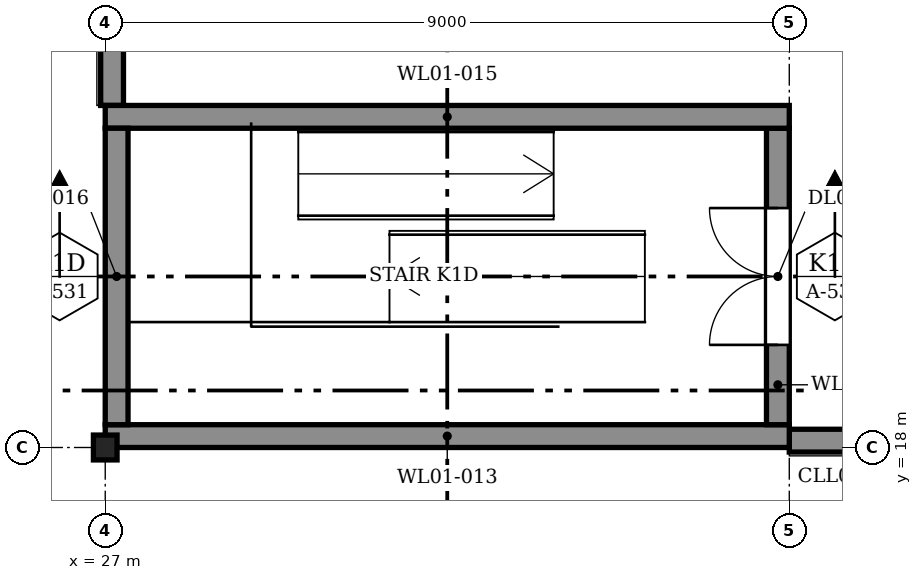
"""IFC4 building model, lengths in metres.
Left out: names, types, materials, properties, quantities, classifications, styles, units other than length and angle.
Written with IfcOpenShell. Run it as: python <this file> out.ifc"""

import sys

from ifc_helpers import new_model, si_unit, direction, frame, frame_2d, origin, origin_2d, place, context, subcontext, project, spatial, rectangle, i_section, extrude, element, fill, save


model = new_model("IFC4")
c1 = context("Model", 3, precision=1e-05, world=origin(), true_north=direction((0.0, 1.0)))
c2 = subcontext(c1, "Body", "Model", "MODEL_VIEW")
j1 = project(units=[si_unit("LENGTHUNIT", "METRE"), si_unit("PLANEANGLEUNIT", "RADIAN")], contexts=[c1])
p1 = place(None, origin())
s1 = spatial("IfcSite", under=j1, at=p1, CompositionType="ELEMENT")
p2 = place(p1, origin())
s2 = spatial("IfcBuilding", under=s1, at=p2, CompositionType="ELEMENT")
p3 = place(p2, frame((0.0, 0.0, 5.0)))
s3 = spatial("IfcBuildingStorey", under=s2, at=p3, CompositionType="ELEMENT", Elevation=5.0)
p4 = place(p3, frame((27.0, 18.0, 0.0), z_axis=(0.0, 0.0, 1.0), x_axis=(1.0, 0.0, 0.0)))
e1 = element("IfcColumn", 1, at=p4, inside=s3, PredefinedType="COLUMN", context=c2, shape_type="SweptSolid", body=[
    extrude(i_section(OverallWidth=0.311, OverallDepth=0.327, WebThickness=0.016, FlangeThickness=0.025, FilletRadius=0.017, at=origin_2d()), origin(), (0.0, 0.0, 1.0), 3.757),
])
p5 = place(p3, frame((27.09, 22.5, 0.0), z_axis=(0.0, 0.0, 1.0), x_axis=(0.0, 1.0, 0.0)))
e2 = element("IfcWall", 2, at=p5, inside=s3, PredefinedType="SOLIDWALL", context=c2, shape_type="SweptSolid", body=[
    extrude(rectangle(XDim=4.35, YDim=0.3, at=frame_2d((2.175, 0.0))), origin(), (0.0, 0.0, 1.0), 3.578),
])
p6 = place(p3, frame((36.0, 18.09, 0.0), z_axis=(0.0, 0.0, 1.0), x_axis=(1.0, 0.0, 0.0)))
e3 = element("IfcWall", 3, at=p6, inside=s3, PredefinedType="SOLIDWALL", context=c2, shape_type="SweptSolid", body=[
    extrude(rectangle(XDim=8.85, YDim=0.3, at=frame_2d((4.425, 0.0))), origin(), (0.0, 0.0, 1.0), 3.578),
])
p7 = place(p6, frame((1.65, 0.0, 0.9)))
e4 = element("IfcOpeningElement", 4, at=p7, cuts=e3, PredefinedType="OPENING", context=c2, shape_type="SweptSolid", body=[
    extrude(rectangle(XDim=1.2, YDim=2.3, at=frame_2d((0.6, 1.15))), frame((0.0, 0.16, 0.0), z_axis=(0.0, -1.0, 0.0), x_axis=(1.0, 0.0, 0.0)), (0.0, 0.0, 1.0), 0.32),
])
p8 = place(p6, frame((6.15, 0.0, 0.9)))
e5 = element("IfcOpeningElement", 5, at=p8, cuts=e3, PredefinedType="OPENING", context=c2, shape_type="SweptSolid", body=[
    extrude(rectangle(XDim=1.2, YDim=2.3, at=frame_2d((0.6, 1.15))), frame((0.0, 0.16, 0.0), z_axis=(0.0, -1.0, 0.0), x_axis=(1.0, 0.0, 0.0)), (0.0, 0.0, 1.0), 0.32),
])
p9 = place(p3, frame((27.0, 18.15, 0.0), z_axis=(0.0, 0.0, 1.0), x_axis=(1.0, 0.0, 0.0)))
e6 = element("IfcWall", 6, at=p9, inside=s3, PredefinedType="SOLIDWALL", context=c2, shape_type="SweptSolid", body=[
    extrude(rectangle(XDim=9.0, YDim=0.3, at=frame_2d((4.5, 0.0))), origin(), (0.0, 0.0, 1.0), 4.2),
])
p10 = place(p3, frame((35.85, 18.3, 0.0), z_axis=(0.0, 0.0, 1.0), x_axis=(0.0, 1.0, 0.0)))
e7 = element("IfcWall", 7, at=p10, inside=s3, PredefinedType="SOLIDWALL", context=c2, shape_type="SweptSolid", body=[
    extrude(rectangle(XDim=3.9, YDim=0.3, at=frame_2d((1.95, 0.0))), origin(), (0.0, 0.0, 1.0), 4.2),
])
p11 = place(p10, frame((1.05, 0.0, 0.0)))
e8 = element("IfcOpeningElement", 8, at=p11, cuts=e7, PredefinedType="OPENING", context=c2, shape_type="SweptSolid", body=[
    extrude(rectangle(XDim=1.8, YDim=2.1, at=frame_2d((0.9, 1.05))), frame((0.0, 0.16, 0.0), z_axis=(0.0, -1.0, 0.0), x_axis=(1.0, 0.0, 0.0)), (0.0, 0.0, 1.0), 0.32),
])
p12 = place(p3, frame((27.0, 22.35, 0.0), z_axis=(0.0, 0.0, 1.0), x_axis=(1.0, 0.0, 0.0)))
e9 = element("IfcWall", 9, at=p12, inside=s3, PredefinedType="SOLIDWALL", context=c2, shape_type="SweptSolid", body=[
    extrude(rectangle(XDim=9.0, YDim=0.3, at=frame_2d((4.5, 0.0))), origin(), (0.0, 0.0, 1.0), 4.2),
])
p13 = place(p3, frame((27.15, 18.3, 0.0), z_axis=(0.0, 0.0, 1.0), x_axis=(0.0, 1.0, 0.0)))
e10 = element("IfcWall", 10, at=p13, inside=s3, PredefinedType="SOLIDWALL", context=c2, shape_type="SweptSolid", body=[
    extrude(rectangle(XDim=3.9, YDim=0.3, at=frame_2d((1.95, 0.0))), origin(), (0.0, 0.0, 1.0), 4.2),
])
p14 = place(p11, origin())
e11 = element("IfcDoor", 11, at=p14, inside=s3, OperationType="DOUBLE_DOOR_SINGLE_SWING", PredefinedType="DOOR", context=c2, shape_type="SweptSolid", body=[
    extrude(rectangle(XDim=1.8, YDim=2.1, at=frame_2d((0.9, 1.05))), frame((0.0, 0.025, 0.0), z_axis=(0.0, -1.0, 0.0), x_axis=(1.0, 0.0, 0.0)), (0.0, 0.0, 1.0), 0.05),
])
fill(e8, e11)
save(model, sys.argv[1])
